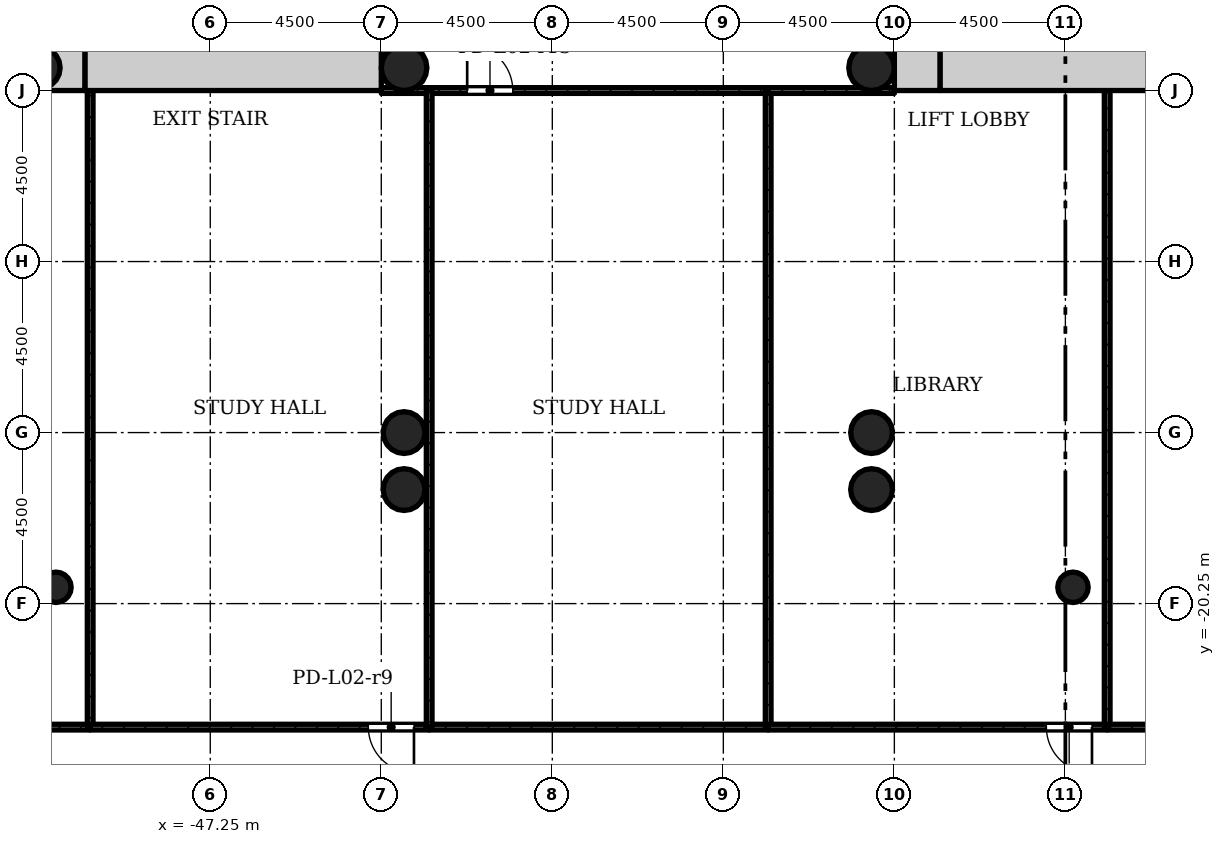
"""IFC4 building model, lengths in metres.
Left out: names, types, materials, properties, quantities, classifications, styles, units other than length and angle.
Written with IfcOpenShell. Run it as: python <this file> out.ifc"""

import sys

from ifc_helpers import new_model, si_unit, direction, frame, frame_2d, origin, origin_2d, place, context, subcontext, project, spatial, rectangle, hollow_circle, extrude, element, fill, save


model = new_model("IFC4")
c1 = context("Model", 3, precision=1e-05, world=origin(), true_north=direction((0.0, 1.0)))
c2 = subcontext(c1, "Body", "Model", "MODEL_VIEW")
j1 = project(units=[si_unit("LENGTHUNIT", "METRE"), si_unit("PLANEANGLEUNIT", "RADIAN")], contexts=[c1])
p1 = place(None, origin())
s1 = spatial("IfcSite", under=j1, at=p1, CompositionType="ELEMENT")
p2 = place(p1, origin())
s2 = spatial("IfcBuilding", under=s1, at=p2, CompositionType="ELEMENT")
p3 = place(p2, frame((0.0, 0.0, 11.0)))
s3 = spatial("IfcBuildingStorey", under=s2, at=p3, CompositionType="ELEMENT", Elevation=11.0)
p4 = place(p3, frame((-28.05, -6.15, 0.0), z_axis=(0.0, 0.0, 1.0), x_axis=(1.0, 0.0, 0.0)))
e1 = element("IfcWall", 1, at=p4, inside=s3, PredefinedType="SHEAR", context=c2, shape_type="SweptSolid", body=[
    extrude(rectangle(XDim=7.8, YDim=1.2, at=frame_2d((3.9, 0.0))), origin(), (0.0, 0.0, 1.0), 4.5),
])
p5 = place(p3, frame((-28.65, 5.55, 0.0), z_axis=(0.0, 0.0, 1.0), x_axis=(0.0, -1.0, 0.0)))
e2 = element("IfcWall", 2, at=p5, inside=s3, PredefinedType="SHEAR", context=c2, shape_type="SweptSolid", body=[
    extrude(rectangle(XDim=12.3, YDim=1.2, at=frame_2d((6.15, 0.0))), origin(), (0.0, 0.0, 1.0), 4.5),
])
p6 = place(p5, frame((4.65, 0.0, 0.0)))
e3 = element("IfcOpeningElement", 3, at=p6, cuts=e2, PredefinedType="OPENING", context=c2, shape_type="SweptSolid", body=[
    extrude(rectangle(XDim=1.8, YDim=2.1, at=frame_2d((0.9, 1.05))), frame((0.0, 0.61, 0.0), z_axis=(0.0, -1.0, 0.0), x_axis=(1.0, 0.0, 0.0)), (0.0, 0.0, 1.0), 1.22),
])
p7 = place(p3, frame((-50.55, -6.15, 0.0), z_axis=(0.0, 0.0, 1.0), x_axis=(1.0, 0.0, 0.0)))
e4 = element("IfcWall", 4, at=p7, inside=s3, PredefinedType="SHEAR", context=c2, shape_type="SweptSolid", body=[
    extrude(rectangle(XDim=7.8, YDim=1.2, at=frame_2d((3.9, 0.0))), origin(), (0.0, 0.0, 1.0), 4.5),
])
p8 = place(p3, frame((-51.15, 5.55, 0.0), z_axis=(0.0, 0.0, 1.0), x_axis=(0.0, -1.0, 0.0)))
e5 = element("IfcWall", 5, at=p8, inside=s3, PredefinedType="SHEAR", context=c2, shape_type="SweptSolid", body=[
    extrude(rectangle(XDim=12.3, YDim=1.2, at=frame_2d((6.15, 0.0))), origin(), (0.0, 0.0, 1.0), 4.5),
])
p9 = place(p8, frame((4.65, 0.0, 0.0)))
e6 = element("IfcOpeningElement", 6, at=p9, cuts=e5, PredefinedType="OPENING", context=c2, shape_type="SweptSolid", body=[
    extrude(rectangle(XDim=1.8, YDim=2.1, at=frame_2d((0.9, 1.05))), frame((0.0, 0.61, 0.0), z_axis=(0.0, -1.0, 0.0), x_axis=(1.0, 0.0, 0.0)), (0.0, 0.0, 1.0), 1.22),
])
for number, where, z_axis, x_axis in (
    (7, (-51.75, -6.15, 0.0), (0.0, 0.0, 1.0), (1.0, 0.0, 0.0)),
    (8, (-42.15, -15.75, 0.0), (0.0, 0.0, 1.0), (1.0, 0.0, 0.0)),
    (9, (-29.85, -15.75, 0.0), (0.0, 0.0, 1.0), (1.0, 0.0, 0.0)),
    (10, (-42.15, -17.25, 0.0), (0.0, 0.0, 1.0), (1.0, 0.0, 0.0)),
    (11, (-29.85, -17.25, 0.0), (0.0, 0.0, 1.0), (1.0, 0.0, 0.0)),
):
    element("IfcColumn", number, at=place(p3, frame(where, z_axis=z_axis, x_axis=x_axis)), inside=s3, PredefinedType="COLUMN", context=c2, shape_type="SweptSolid", body=[
        extrude(hollow_circle(Radius=0.55, WallThickness=0.04, at=origin_2d()), origin(), (0.0, 0.0, 1.0), 4.5),
    ])
for number, where, z_axis, x_axis in (
    (12, (-42.15, -6.15, 0.0), (0.0, 0.0, 1.0), (1.0, 0.0, 0.0)),
    (13, (-29.85, -6.15, 0.0), (0.0, 0.0, 1.0), (1.0, 0.0, 0.0)),
):
    element("IfcColumn", number, at=place(p3, frame(where, z_axis=z_axis, x_axis=x_axis)), inside=s3, PredefinedType="COLUMN", context=c2, shape_type="SweptSolid", body=[
        extrude(hollow_circle(Radius=0.6, WallThickness=0.045, at=origin_2d()), origin(), (0.0, 0.0, 1.0), 4.5),
    ])
for number, where, z_axis, x_axis in (
    (14, (-51.31, -19.821, 0.0), (0.0, 0.0, 1.0), (1.0, 0.0, 0.0)),
    (15, (-24.55, -19.821, 0.0), (0.0, 0.0, 1.0), (1.0, 0.0, 0.0)),
):
    element("IfcColumn", number, at=place(p3, frame(where, z_axis=z_axis, x_axis=x_axis)), inside=s3, PredefinedType="COLUMN", context=c2, shape_type="SweptSolid", body=[
        extrude(hollow_circle(Radius=0.4, WallThickness=0.028, at=origin_2d()), origin(), (0.0, 0.0, 1.0), 4.5),
    ])
p10 = place(p3, frame((-50.41, -23.5, 0.0), z_axis=(0.0, 0.0, 1.0), x_axis=(-1.0, 0.0, 0.0)))
e16 = element("IfcWall", 16, at=p10, inside=s3, PredefinedType="PARTITIONING", context=c2, shape_type="SweptSolid", body=[
    extrude(rectangle(XDim=1.96, YDim=0.15, at=frame_2d((0.98, 0.0))), origin(), (0.0, 0.0, 1.0), 4.08),
])
p11 = place(p3, frame((-50.41, -6.75, 0.0), z_axis=(0.0, 0.0, 1.0), x_axis=(0.0, -1.0, 0.0)))
e17 = element("IfcWall", 17, at=p11, inside=s3, PredefinedType="PARTITIONING", context=c2, shape_type="SweptSolid", body=[
    extrude(rectangle(XDim=16.75, YDim=0.15, at=frame_2d((8.375, 0.0))), origin(), (0.0, 0.0, 1.0), 4.08),
])
p12 = place(p3, frame((-42.75, -6.75, 0.0), z_axis=(0.0, 0.0, 1.0), x_axis=(1.0, 0.0, 0.0)))
e18 = element("IfcWall", 18, at=p12, inside=s3, PredefinedType="PARTITIONING", context=c2, shape_type="SweptSolid", body=[
    extrude(rectangle(XDim=1.26, YDim=0.15, at=frame_2d((0.63, 0.0))), origin(), (0.0, 0.0, 1.0), 4.08),
])
p13 = place(p3, frame((-41.49, -23.5, 0.0), z_axis=(0.0, 0.0, 1.0), x_axis=(-1.0, 0.0, 0.0)))
e19 = element("IfcWall", 19, at=p13, inside=s3, PredefinedType="PARTITIONING", context=c2, shape_type="SweptSolid", body=[
    extrude(rectangle(XDim=8.92, YDim=0.15, at=frame_2d((4.46, 0.0))), origin(), (0.0, 0.0, 1.0), 4.08),
])
p14 = place(p13, frame((0.4, 0.0, 0.0)))
e20 = element("IfcOpeningElement", 20, at=p14, cuts=e19, PredefinedType="OPENING", context=c2, shape_type="SweptSolid", body=[
    extrude(rectangle(XDim=1.2, YDim=2.1, at=frame_2d((0.6, 1.05))), frame((0.0, 0.085, 0.0), z_axis=(0.0, -1.0, 0.0), x_axis=(1.0, 0.0, 0.0)), (0.0, 0.0, 1.0), 0.17),
])
p15 = place(p3, frame((-41.49, -6.75, 0.0), z_axis=(0.0, 0.0, 1.0), x_axis=(1.0, 0.0, 0.0)))
e21 = element("IfcWall", 21, at=p15, inside=s3, PredefinedType="PARTITIONING", context=c2, shape_type="SweptSolid", body=[
    extrude(rectangle(XDim=8.92, YDim=0.15, at=frame_2d((4.46, 0.0))), origin(), (0.0, 0.0, 1.0), 4.08),
])
p16 = place(p15, frame((1.0, 0.0, 0.0)))
e22 = element("IfcOpeningElement", 22, at=p16, cuts=e21, PredefinedType="OPENING", context=c2, shape_type="SweptSolid", body=[
    extrude(rectangle(XDim=1.2, YDim=2.1, at=frame_2d((0.6, 1.05))), frame((0.0, 0.085, 0.0), z_axis=(0.0, -1.0, 0.0), x_axis=(1.0, 0.0, 0.0)), (0.0, 0.0, 1.0), 0.17),
])
p17 = place(p3, frame((-32.57, -23.5, 0.0), z_axis=(0.0, 0.0, 1.0), x_axis=(-1.0, 0.0, 0.0)))
e23 = element("IfcWall", 23, at=p17, inside=s3, PredefinedType="PARTITIONING", context=c2, shape_type="SweptSolid", body=[
    extrude(rectangle(XDim=8.92, YDim=0.15, at=frame_2d((4.46, 0.0))), origin(), (0.0, 0.0, 1.0), 4.08),
])
for number, where, z_axis, x_axis in (
    (24, (-41.49, -23.5, 0.0), (0.0, 0.0, 1.0), (0.0, 1.0, 0.0)),
    (25, (-32.57, -6.75, 0.0), (0.0, 0.0, 1.0), (0.0, -1.0, 0.0)),
):
    element("IfcWall", number, at=place(p3, frame(where, z_axis=z_axis, x_axis=x_axis)), inside=s3, PredefinedType="PARTITIONING", context=c2, shape_type="SweptSolid", body=[
        extrude(rectangle(XDim=16.75, YDim=0.15, at=frame_2d((8.375, 0.0))), origin(), (0.0, 0.0, 1.0), 4.08),
    ])
p18 = place(p3, frame((-32.57, -6.75, 0.0), z_axis=(0.0, 0.0, 1.0), x_axis=(1.0, 0.0, 0.0)))
e26 = element("IfcWall", 26, at=p18, inside=s3, PredefinedType="PARTITIONING", context=c2, shape_type="SweptSolid", body=[
    extrude(rectangle(XDim=3.32, YDim=0.15, at=frame_2d((1.66, 0.0))), origin(), (0.0, 0.0, 1.0), 4.08),
])
p19 = place(p3, frame((-23.65, -23.5, 0.0), z_axis=(0.0, 0.0, 1.0), x_axis=(-1.0, 0.0, 0.0)))
e27 = element("IfcWall", 27, at=p19, inside=s3, PredefinedType="PARTITIONING", context=c2, shape_type="SweptSolid", body=[
    extrude(rectangle(XDim=8.92, YDim=0.15, at=frame_2d((4.46, 0.0))), origin(), (0.0, 0.0, 1.0), 4.08),
])
p20 = place(p19, frame((0.4, 0.0, 0.0)))
e28 = element("IfcOpeningElement", 28, at=p20, cuts=e27, PredefinedType="OPENING", context=c2, shape_type="SweptSolid", body=[
    extrude(rectangle(XDim=1.2, YDim=2.1, at=frame_2d((0.6, 1.05))), frame((0.0, 0.085, 0.0), z_axis=(0.0, -1.0, 0.0), x_axis=(1.0, 0.0, 0.0)), (0.0, 0.0, 1.0), 0.17),
])
p21 = place(p3, frame((-23.65, -6.75, 0.0), z_axis=(0.0, 0.0, 1.0), x_axis=(0.0, -1.0, 0.0)))
e29 = element("IfcWall", 29, at=p21, inside=s3, PredefinedType="PARTITIONING", context=c2, shape_type="SweptSolid", body=[
    extrude(rectangle(XDim=16.75, YDim=0.15, at=frame_2d((8.375, 0.0))), origin(), (0.0, 0.0, 1.0), 4.08),
])
p22 = place(p3, frame((-14.73, -23.5, 0.0), z_axis=(0.0, 0.0, 1.0), x_axis=(-1.0, 0.0, 0.0)))
e30 = element("IfcWall", 30, at=p22, inside=s3, PredefinedType="PARTITIONING", context=c2, shape_type="SweptSolid", body=[
    extrude(rectangle(XDim=8.92, YDim=0.15, at=frame_2d((4.46, 0.0))), origin(), (0.0, 0.0, 1.0), 4.08),
])
p23 = place(p22, frame((0.4, 0.0, 0.0)))
e31 = element("IfcOpeningElement", 31, at=p23, cuts=e30, PredefinedType="OPENING", context=c2, shape_type="SweptSolid", body=[
    extrude(rectangle(XDim=1.2, YDim=2.1, at=frame_2d((0.6, 1.05))), frame((0.0, 0.085, 0.0), z_axis=(0.0, -1.0, 0.0), x_axis=(1.0, 0.0, 0.0)), (0.0, 0.0, 1.0), 0.17),
])
p24 = place(p14, origin())
e32 = element("IfcDoor", 32, at=p24, inside=s3, OperationType="SINGLE_SWING_RIGHT", PredefinedType="DOOR", context=c2, shape_type="SweptSolid", body=[
    extrude(rectangle(XDim=1.2, YDim=2.1, at=frame_2d((0.6, 1.05))), frame((0.0, 0.025, 0.0), z_axis=(0.0, -1.0, 0.0), x_axis=(1.0, 0.0, 0.0)), (0.0, 0.0, 1.0), 0.05),
])
fill(e20, e32)
p25 = place(p16, origin())
e33 = element("IfcDoor", 33, at=p25, inside=s3, OperationType="SINGLE_SWING_RIGHT", PredefinedType="DOOR", context=c2, shape_type="SweptSolid", body=[
    extrude(rectangle(XDim=1.2, YDim=2.1, at=frame_2d((0.6, 1.05))), frame((0.0, 0.025, 0.0), z_axis=(0.0, -1.0, 0.0), x_axis=(1.0, 0.0, 0.0)), (0.0, 0.0, 1.0), 0.05),
])
fill(e22, e33)
p26 = place(p20, origin())
e34 = element("IfcDoor", 34, at=p26, inside=s3, OperationType="SINGLE_SWING_RIGHT", PredefinedType="DOOR", context=c2, shape_type="SweptSolid", body=[
    extrude(rectangle(XDim=1.2, YDim=2.1, at=frame_2d((0.6, 1.05))), frame((0.0, 0.025, 0.0), z_axis=(0.0, -1.0, 0.0), x_axis=(1.0, 0.0, 0.0)), (0.0, 0.0, 1.0), 0.05),
])
fill(e28, e34)
save(model, sys.argv[1])
